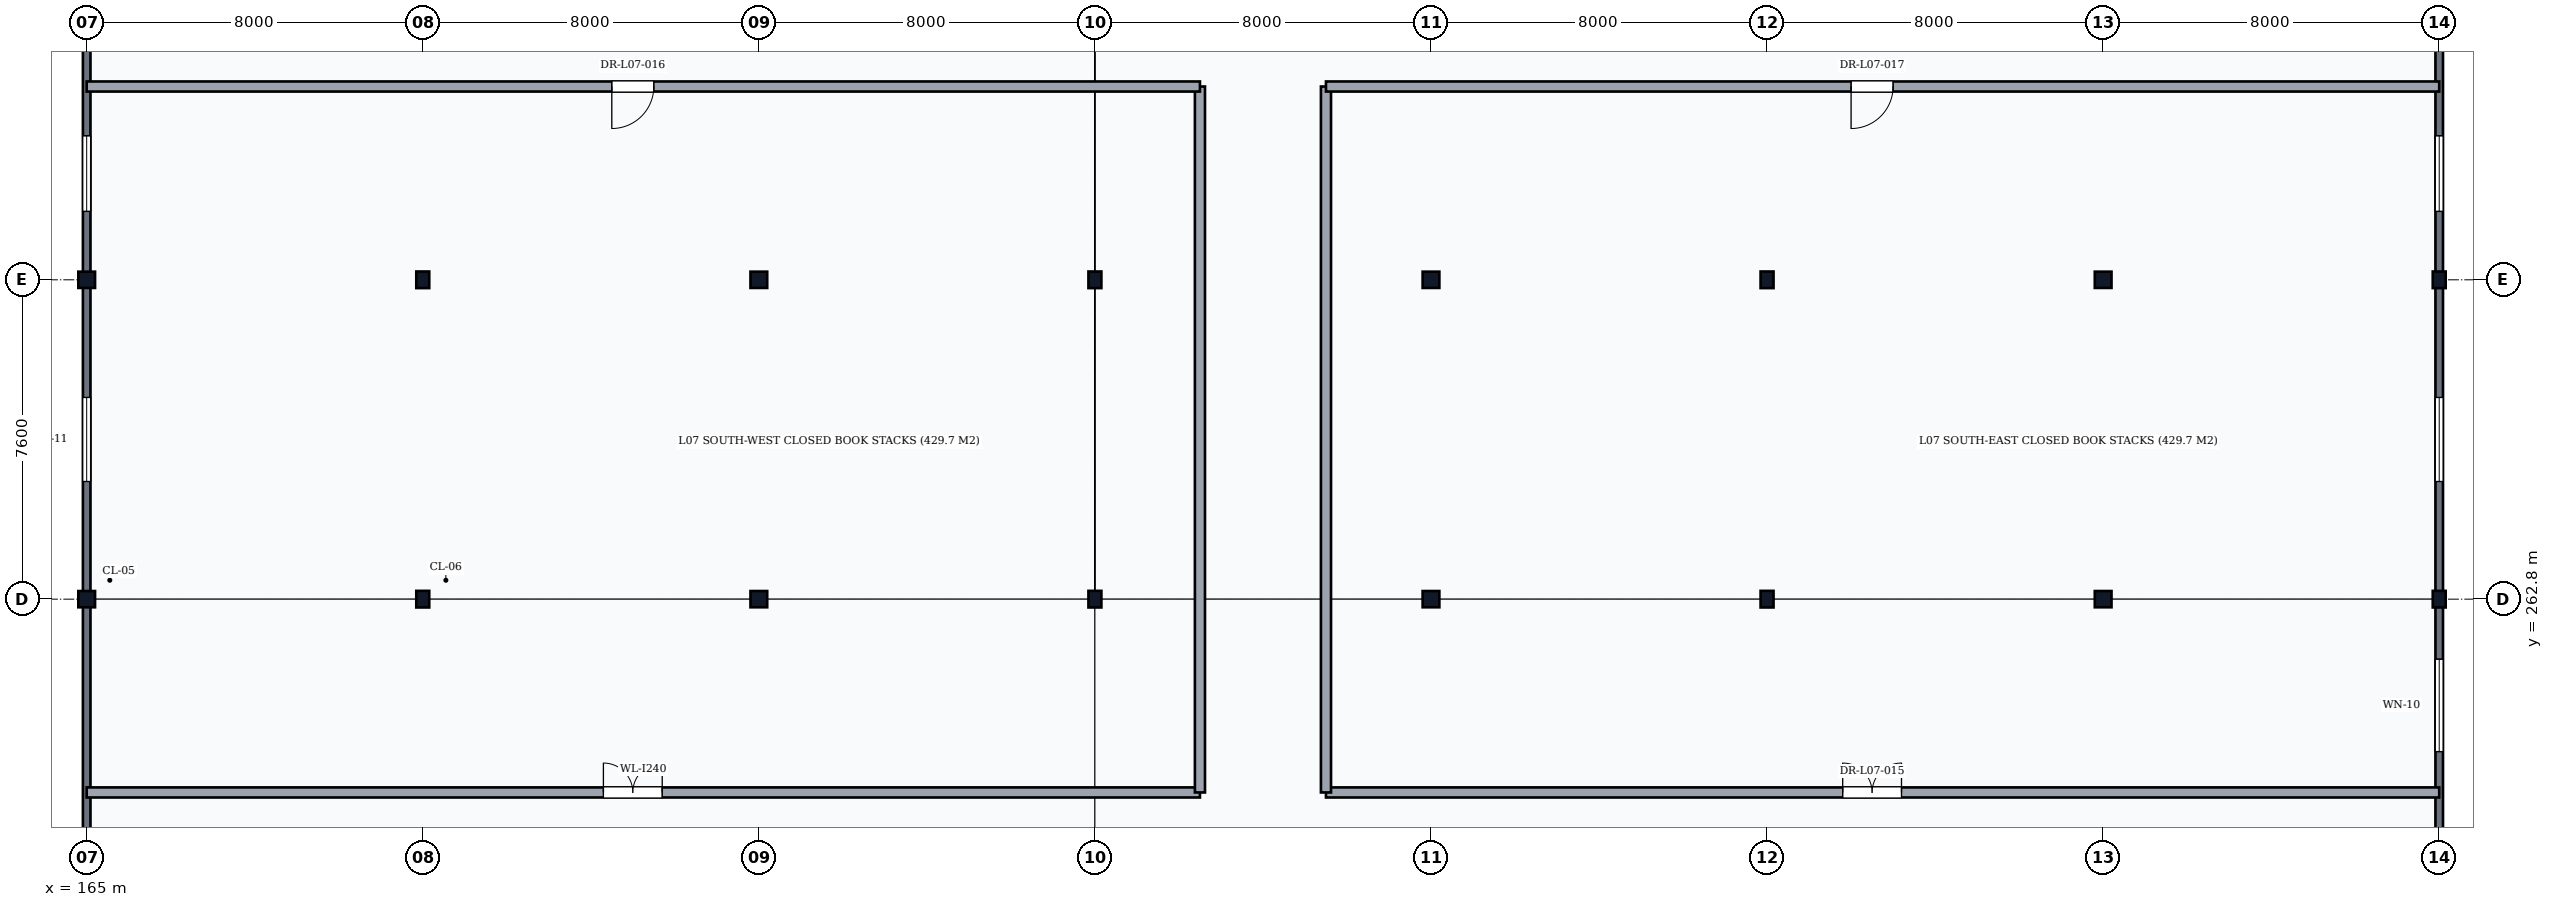
"""IFC4 building model, lengths in metres.
Left out: names, types, materials, properties, quantities, classifications, styles, units other than length and angle.
Written with IfcOpenShell. Run it as: python <this file> out.ifc"""

import sys

from ifc_helpers import new_model, si_unit, direction, frame, frame_2d, origin, origin_2d, place, context, subcontext, project, spatial, rectangle, i_section, extrude, element, fill, save


model = new_model("IFC4")
c1 = context("Model", 3, precision=1e-05, world=origin(), true_north=direction((0.0, 1.0)))
c2 = subcontext(c1, "Body", "Model", "MODEL_VIEW")
j1 = project(units=[si_unit("LENGTHUNIT", "METRE"), si_unit("PLANEANGLEUNIT", "RADIAN")], contexts=[c1])
p1 = place(None, origin())
s1 = spatial("IfcSite", under=j1, at=p1, CompositionType="ELEMENT")
p2 = place(p1, origin())
s2 = spatial("IfcBuilding", under=s1, at=p2, CompositionType="ELEMENT")
p3 = place(p2, frame((0.0, 0.0, 28.2)))
s3 = spatial("IfcBuildingStorey", under=s2, at=p3, CompositionType="ELEMENT", Elevation=28.2)
for number, where, z_axis, x_axis in (
    (1, (165.0, 262.8, 0.0), (0.0, 0.0, 1.0), (1.0, 0.0, 0.0)),
    (2, (165.0, 270.4, 0.0), (0.0, 0.0, 1.0), (1.0, 0.0, 0.0)),
):
    element("IfcColumn", number, at=place(p3, frame(where, z_axis=z_axis, x_axis=x_axis)), inside=s3, PredefinedType="COLUMN", context=c2, shape_type="SweptSolid", body=[
        extrude(i_section(OverallWidth=0.398, OverallDepth=0.387, WebThickness=0.021, FlangeThickness=0.033, FilletRadius=0.015, at=origin_2d()), origin(), (0.0, 0.0, 1.0), 3.9),
    ])
for number, where, z_axis, x_axis in (
    (3, (173.0, 262.8, 0.0), (0.0, 0.0, 1.0), (1.0, 0.0, 0.0)),
    (4, (173.0, 270.4, 0.0), (0.0, 0.0, 1.0), (1.0, 0.0, 0.0)),
):
    element("IfcColumn", number, at=place(p3, frame(where, z_axis=z_axis, x_axis=x_axis)), inside=s3, PredefinedType="COLUMN", context=c2, shape_type="SweptSolid", body=[
        extrude(i_section(OverallWidth=0.308, OverallDepth=0.395, WebThickness=0.021, FlangeThickness=0.04, FilletRadius=0.027, at=origin_2d()), origin(), (0.0, 0.0, 1.0), 3.9),
    ])
for number, where, z_axis, x_axis in (
    (5, (181.0, 262.8, 0.0), (0.0, 0.0, 1.0), (1.0, 0.0, 0.0)),
    (6, (181.0, 270.4, 0.0), (0.0, 0.0, 1.0), (1.0, 0.0, 0.0)),
):
    element("IfcColumn", number, at=place(p3, frame(where, z_axis=z_axis, x_axis=x_axis)), inside=s3, PredefinedType="COLUMN", context=c2, shape_type="SweptSolid", body=[
        extrude(i_section(OverallWidth=0.398, OverallDepth=0.387, WebThickness=0.021, FlangeThickness=0.033, FilletRadius=0.015, at=origin_2d()), origin(), (0.0, 0.0, 1.0), 3.9),
    ])
for number, where, z_axis, x_axis in (
    (7, (189.0, 262.8, 0.0), (0.0, 0.0, 1.0), (1.0, 0.0, 0.0)),
    (8, (189.0, 270.4, 0.0), (0.0, 0.0, 1.0), (1.0, 0.0, 0.0)),
):
    element("IfcColumn", number, at=place(p3, frame(where, z_axis=z_axis, x_axis=x_axis)), inside=s3, PredefinedType="COLUMN", context=c2, shape_type="SweptSolid", body=[
        extrude(i_section(OverallWidth=0.308, OverallDepth=0.395, WebThickness=0.021, FlangeThickness=0.04, FilletRadius=0.027, at=origin_2d()), origin(), (0.0, 0.0, 1.0), 3.9),
    ])
for number, where, z_axis, x_axis in (
    (9, (197.0, 262.8, 0.0), (0.0, 0.0, 1.0), (1.0, 0.0, 0.0)),
    (10, (197.0, 270.4, 0.0), (0.0, 0.0, 1.0), (1.0, 0.0, 0.0)),
):
    element("IfcColumn", number, at=place(p3, frame(where, z_axis=z_axis, x_axis=x_axis)), inside=s3, PredefinedType="COLUMN", context=c2, shape_type="SweptSolid", body=[
        extrude(i_section(OverallWidth=0.398, OverallDepth=0.387, WebThickness=0.021, FlangeThickness=0.033, FilletRadius=0.015, at=origin_2d()), origin(), (0.0, 0.0, 1.0), 3.9),
    ])
for number, where, z_axis, x_axis in (
    (11, (205.0, 262.8, 0.0), (0.0, 0.0, 1.0), (1.0, 0.0, 0.0)),
    (12, (205.0, 270.4, 0.0), (0.0, 0.0, 1.0), (1.0, 0.0, 0.0)),
):
    element("IfcColumn", number, at=place(p3, frame(where, z_axis=z_axis, x_axis=x_axis)), inside=s3, PredefinedType="COLUMN", context=c2, shape_type="SweptSolid", body=[
        extrude(i_section(OverallWidth=0.308, OverallDepth=0.395, WebThickness=0.021, FlangeThickness=0.04, FilletRadius=0.027, at=origin_2d()), origin(), (0.0, 0.0, 1.0), 3.9),
    ])
for number, where, z_axis, x_axis in (
    (13, (213.0, 262.8, 0.0), (0.0, 0.0, 1.0), (1.0, 0.0, 0.0)),
    (14, (213.0, 270.4, 0.0), (0.0, 0.0, 1.0), (1.0, 0.0, 0.0)),
):
    element("IfcColumn", number, at=place(p3, frame(where, z_axis=z_axis, x_axis=x_axis)), inside=s3, PredefinedType="COLUMN", context=c2, shape_type="SweptSolid", body=[
        extrude(i_section(OverallWidth=0.398, OverallDepth=0.387, WebThickness=0.021, FlangeThickness=0.033, FilletRadius=0.015, at=origin_2d()), origin(), (0.0, 0.0, 1.0), 3.9),
    ])
for number, where, z_axis, x_axis in (
    (15, (221.0, 262.8, 0.0), (0.0, 0.0, 1.0), (1.0, 0.0, 0.0)),
    (16, (221.0, 270.4, 0.0), (0.0, 0.0, 1.0), (1.0, 0.0, 0.0)),
):
    element("IfcColumn", number, at=place(p3, frame(where, z_axis=z_axis, x_axis=x_axis)), inside=s3, PredefinedType="COLUMN", context=c2, shape_type="SweptSolid", body=[
        extrude(i_section(OverallWidth=0.308, OverallDepth=0.395, WebThickness=0.021, FlangeThickness=0.04, FilletRadius=0.027, at=origin_2d()), origin(), (0.0, 0.0, 1.0), 3.9),
    ])
p4 = place(p3, frame((165.0, 255.206, 0.0), z_axis=(0.0, 0.0, 1.0), x_axis=(0.0, 1.0, 0.0)))
e17 = element("IfcWall", 17, at=p4, inside=s3, PredefinedType="SOLIDWALL", context=c2, shape_type="SweptSolid", body=[
    extrude(rectangle(XDim=7.588, YDim=0.18, at=frame_2d((3.794, 0.0))), origin(), (0.0, 0.0, 1.0), 3.388),
])
p5 = place(p3, frame((165.0, 262.806, 0.0), z_axis=(0.0, 0.0, 1.0), x_axis=(0.0, 1.0, 0.0)))
e18 = element("IfcWall", 18, at=p5, inside=s3, PredefinedType="SOLIDWALL", context=c2, shape_type="SweptSolid", body=[
    extrude(rectangle(XDim=7.588, YDim=0.18, at=frame_2d((3.794, 0.0))), origin(), (0.0, 0.0, 1.0), 3.388),
])
p6 = place(p5, frame((2.794, 0.0, 0.95)))
e19 = element("IfcOpeningElement", 19, at=p6, cuts=e18, PredefinedType="OPENING", context=c2, shape_type="SweptSolid", body=[
    extrude(rectangle(XDim=2.0, YDim=2.1, at=frame_2d((1.0, 1.05))), frame((0.0, 0.105, 0.0), z_axis=(0.0, -1.0, 0.0), x_axis=(1.0, 0.0, 0.0)), (0.0, 0.0, 1.0), 0.21),
])
p7 = place(p3, frame((165.0, 270.406, 0.0), z_axis=(0.0, 0.0, 1.0), x_axis=(0.0, 1.0, 0.0)))
e20 = element("IfcWall", 20, at=p7, inside=s3, PredefinedType="SOLIDWALL", context=c2, shape_type="SweptSolid", body=[
    extrude(rectangle(XDim=7.588, YDim=0.18, at=frame_2d((3.794, 0.0))), origin(), (0.0, 0.0, 1.0), 3.388),
])
p8 = place(p7, frame((1.622, 0.0, 0.95)))
e21 = element("IfcOpeningElement", 21, at=p8, cuts=e20, PredefinedType="OPENING", context=c2, shape_type="SweptSolid", body=[
    extrude(rectangle(XDim=1.8, YDim=2.0, at=frame_2d((0.9, 1.0))), frame((0.0, 0.105, 0.0), z_axis=(0.0, -1.0, 0.0), x_axis=(1.0, 0.0, 0.0)), (0.0, 0.0, 1.0), 0.21),
])
p9 = place(p3, frame((221.0, 255.206, 0.0), z_axis=(0.0, 0.0, 1.0), x_axis=(0.0, 1.0, 0.0)))
e22 = element("IfcWall", 22, at=p9, inside=s3, PredefinedType="SOLIDWALL", context=c2, shape_type="SweptSolid", body=[
    extrude(rectangle(XDim=7.588, YDim=0.18, at=frame_2d((3.794, 0.0))), origin(), (0.0, 0.0, 1.0), 3.388),
])
p10 = place(p9, frame((3.966, 0.0, 0.95)))
e23 = element("IfcOpeningElement", 23, at=p10, cuts=e22, PredefinedType="OPENING", context=c2, shape_type="SweptSolid", body=[
    extrude(rectangle(XDim=2.2, YDim=2.1, at=frame_2d((1.1, 1.05))), frame((0.0, 0.105, 0.0), z_axis=(0.0, -1.0, 0.0), x_axis=(1.0, 0.0, 0.0)), (0.0, 0.0, 1.0), 0.21),
])
p11 = place(p3, frame((221.0, 262.806, 0.0), z_axis=(0.0, 0.0, 1.0), x_axis=(0.0, 1.0, 0.0)))
e24 = element("IfcWall", 24, at=p11, inside=s3, PredefinedType="SOLIDWALL", context=c2, shape_type="SweptSolid", body=[
    extrude(rectangle(XDim=7.588, YDim=0.18, at=frame_2d((3.794, 0.0))), origin(), (0.0, 0.0, 1.0), 3.388),
])
p12 = place(p11, frame((2.794, 0.0, 0.95)))
e25 = element("IfcOpeningElement", 25, at=p12, cuts=e24, PredefinedType="OPENING", context=c2, shape_type="SweptSolid", body=[
    extrude(rectangle(XDim=2.0, YDim=2.1, at=frame_2d((1.0, 1.05))), frame((0.0, 0.105, 0.0), z_axis=(0.0, -1.0, 0.0), x_axis=(1.0, 0.0, 0.0)), (0.0, 0.0, 1.0), 0.21),
])
p13 = place(p3, frame((221.0, 270.406, 0.0), z_axis=(0.0, 0.0, 1.0), x_axis=(0.0, 1.0, 0.0)))
e26 = element("IfcWall", 26, at=p13, inside=s3, PredefinedType="SOLIDWALL", context=c2, shape_type="SweptSolid", body=[
    extrude(rectangle(XDim=7.588, YDim=0.18, at=frame_2d((3.794, 0.0))), origin(), (0.0, 0.0, 1.0), 3.388),
])
p14 = place(p13, frame((1.622, 0.0, 0.95)))
e27 = element("IfcOpeningElement", 27, at=p14, cuts=e26, PredefinedType="OPENING", context=c2, shape_type="SweptSolid", body=[
    extrude(rectangle(XDim=1.8, YDim=2.0, at=frame_2d((0.9, 1.0))), frame((0.0, 0.105, 0.0), z_axis=(0.0, -1.0, 0.0), x_axis=(1.0, 0.0, 0.0)), (0.0, 0.0, 1.0), 0.21),
])
p15 = place(p3, frame((165.0, 258.2, 0.0), z_axis=(0.0, 0.0, 1.0), x_axis=(1.0, 0.0, 0.0)))
e28 = element("IfcWall", 28, at=p15, inside=s3, PredefinedType="PARTITIONING", context=c2, shape_type="SweptSolid", body=[
    extrude(rectangle(XDim=26.5, YDim=0.24, at=frame_2d((13.25, 0.0))), origin(), (0.0, 0.0, 1.0), 3.66),
])
p16 = place(p15, frame((12.3, 0.0, 0.0)))
e29 = element("IfcOpeningElement", 29, at=p16, cuts=e28, PredefinedType="OPENING", context=c2, shape_type="SweptSolid", body=[
    extrude(rectangle(XDim=1.4, YDim=2.1, at=frame_2d((0.7, 1.05))), frame((0.0, 0.135, 0.0), z_axis=(0.0, -1.0, 0.0), x_axis=(1.0, 0.0, 0.0)), (0.0, 0.0, 1.0), 0.27),
])
p17 = place(p3, frame((194.5, 258.2, 0.0), z_axis=(0.0, 0.0, 1.0), x_axis=(1.0, 0.0, 0.0)))
e30 = element("IfcWall", 30, at=p17, inside=s3, PredefinedType="PARTITIONING", context=c2, shape_type="SweptSolid", body=[
    extrude(rectangle(XDim=26.5, YDim=0.24, at=frame_2d((13.25, 0.0))), origin(), (0.0, 0.0, 1.0), 3.66),
])
p18 = place(p17, frame((12.3, 0.0, 0.0)))
e31 = element("IfcOpeningElement", 31, at=p18, cuts=e30, PredefinedType="OPENING", context=c2, shape_type="SweptSolid", body=[
    extrude(rectangle(XDim=1.4, YDim=2.1, at=frame_2d((0.7, 1.05))), frame((0.0, 0.135, 0.0), z_axis=(0.0, -1.0, 0.0), x_axis=(1.0, 0.0, 0.0)), (0.0, 0.0, 1.0), 0.27),
])
for number, where, z_axis, x_axis in (
    (32, (191.5, 258.2, 0.0), (0.0, 0.0, 1.0), (0.0, 1.0, 0.0)),
    (33, (194.5, 258.2, 0.0), (0.0, 0.0, 1.0), (0.0, 1.0, 0.0)),
):
    element("IfcWall", number, at=place(p3, frame(where, z_axis=z_axis, x_axis=x_axis)), inside=s3, PredefinedType="PARTITIONING", context=c2, shape_type="SweptSolid", body=[
        extrude(rectangle(XDim=16.8, YDim=0.24, at=frame_2d((8.4, 0.0))), origin(), (0.0, 0.0, 1.0), 3.66),
    ])
p19 = place(p3, frame((165.0, 275.0, 0.0), z_axis=(0.0, 0.0, 1.0), x_axis=(1.0, 0.0, 0.0)))
e34 = element("IfcWall", 34, at=p19, inside=s3, PredefinedType="PARTITIONING", context=c2, shape_type="SweptSolid", body=[
    extrude(rectangle(XDim=26.5, YDim=0.24, at=frame_2d((13.25, 0.0))), origin(), (0.0, 0.0, 1.0), 3.66),
])
p20 = place(p19, frame((12.5, 0.0, 0.0)))
e35 = element("IfcOpeningElement", 35, at=p20, cuts=e34, PredefinedType="OPENING", context=c2, shape_type="SweptSolid", body=[
    extrude(rectangle(XDim=1.0, YDim=2.1, at=frame_2d((0.5, 1.05))), frame((0.0, 0.135, 0.0), z_axis=(0.0, -1.0, 0.0), x_axis=(1.0, 0.0, 0.0)), (0.0, 0.0, 1.0), 0.27),
])
p21 = place(p3, frame((194.5, 275.0, 0.0), z_axis=(0.0, 0.0, 1.0), x_axis=(1.0, 0.0, 0.0)))
e36 = element("IfcWall", 36, at=p21, inside=s3, PredefinedType="PARTITIONING", context=c2, shape_type="SweptSolid", body=[
    extrude(rectangle(XDim=26.5, YDim=0.24, at=frame_2d((13.25, 0.0))), origin(), (0.0, 0.0, 1.0), 3.66),
])
p22 = place(p21, frame((12.5, 0.0, 0.0)))
e37 = element("IfcOpeningElement", 37, at=p22, cuts=e36, PredefinedType="OPENING", context=c2, shape_type="SweptSolid", body=[
    extrude(rectangle(XDim=1.0, YDim=2.1, at=frame_2d((0.5, 1.05))), frame((0.0, 0.135, 0.0), z_axis=(0.0, -1.0, 0.0), x_axis=(1.0, 0.0, 0.0)), (0.0, 0.0, 1.0), 0.27),
])
p23 = place(p6, origin())
e38 = element("IfcWindow", 38, at=p23, inside=s3, PartitioningType="DOUBLE_PANEL_VERTICAL", PredefinedType="WINDOW", context=c2, shape_type="SweptSolid", body=[
    extrude(rectangle(XDim=2.0, YDim=2.1, at=frame_2d((1.0, 1.05))), frame((0.0, 0.03, 0.0), z_axis=(0.0, -1.0, 0.0), x_axis=(1.0, 0.0, 0.0)), (0.0, 0.0, 1.0), 0.06),
])
fill(e19, e38)
p24 = place(p8, origin())
e39 = element("IfcWindow", 39, at=p24, inside=s3, PartitioningType="DOUBLE_PANEL_VERTICAL", PredefinedType="WINDOW", context=c2, shape_type="SweptSolid", body=[
    extrude(rectangle(XDim=1.8, YDim=2.0, at=frame_2d((0.9, 1.0))), frame((0.0, 0.03, 0.0), z_axis=(0.0, -1.0, 0.0), x_axis=(1.0, 0.0, 0.0)), (0.0, 0.0, 1.0), 0.06),
])
fill(e21, e39)
p25 = place(p10, origin())
e40 = element("IfcWindow", 40, at=p25, inside=s3, PartitioningType="DOUBLE_PANEL_VERTICAL", PredefinedType="WINDOW", context=c2, shape_type="SweptSolid", body=[
    extrude(rectangle(XDim=2.2, YDim=2.1, at=frame_2d((1.1, 1.05))), frame((0.0, 0.03, 0.0), z_axis=(0.0, -1.0, 0.0), x_axis=(1.0, 0.0, 0.0)), (0.0, 0.0, 1.0), 0.06),
])
fill(e23, e40)
p26 = place(p12, origin())
e41 = element("IfcWindow", 41, at=p26, inside=s3, PartitioningType="DOUBLE_PANEL_VERTICAL", PredefinedType="WINDOW", context=c2, shape_type="SweptSolid", body=[
    extrude(rectangle(XDim=2.0, YDim=2.1, at=frame_2d((1.0, 1.05))), frame((0.0, 0.03, 0.0), z_axis=(0.0, -1.0, 0.0), x_axis=(1.0, 0.0, 0.0)), (0.0, 0.0, 1.0), 0.06),
])
fill(e25, e41)
p27 = place(p14, origin())
e42 = element("IfcWindow", 42, at=p27, inside=s3, PartitioningType="DOUBLE_PANEL_VERTICAL", PredefinedType="WINDOW", context=c2, shape_type="SweptSolid", body=[
    extrude(rectangle(XDim=1.8, YDim=2.0, at=frame_2d((0.9, 1.0))), frame((0.0, 0.03, 0.0), z_axis=(0.0, -1.0, 0.0), x_axis=(1.0, 0.0, 0.0)), (0.0, 0.0, 1.0), 0.06),
])
fill(e27, e42)
p28 = place(p16, origin())
e43 = element("IfcDoor", 43, at=p28, inside=s3, OperationType="DOUBLE_DOOR_SINGLE_SWING", PredefinedType="DOOR", context=c2, shape_type="SweptSolid", body=[
    extrude(rectangle(XDim=1.4, YDim=2.1, at=frame_2d((0.7, 1.05))), frame((0.0, 0.025, 0.0), z_axis=(0.0, -1.0, 0.0), x_axis=(1.0, 0.0, 0.0)), (0.0, 0.0, 1.0), 0.05),
])
fill(e29, e43)
p29 = place(p18, origin())
e44 = element("IfcDoor", 44, at=p29, inside=s3, OperationType="DOUBLE_DOOR_SINGLE_SWING", PredefinedType="DOOR", context=c2, shape_type="SweptSolid", body=[
    extrude(rectangle(XDim=1.4, YDim=2.1, at=frame_2d((0.7, 1.05))), frame((0.0, 0.025, 0.0), z_axis=(0.0, -1.0, 0.0), x_axis=(1.0, 0.0, 0.0)), (0.0, 0.0, 1.0), 0.05),
])
fill(e31, e44)
p30 = place(p20, frame((1.0, 0.0, 0.0), z_axis=(0.0, 0.0, 1.0), x_axis=(-1.0, 0.0, 0.0)))
e45 = element("IfcDoor", 45, at=p30, inside=s3, OperationType="SINGLE_SWING_RIGHT", PredefinedType="DOOR", context=c2, shape_type="SweptSolid", body=[
    extrude(rectangle(XDim=1.0, YDim=2.1, at=frame_2d((0.5, 1.05))), frame((0.0, 0.025, 0.0), z_axis=(0.0, -1.0, 0.0), x_axis=(1.0, 0.0, 0.0)), (0.0, 0.0, 1.0), 0.05),
])
fill(e35, e45)
p31 = place(p22, frame((1.0, 0.0, 0.0), z_axis=(0.0, 0.0, 1.0), x_axis=(-1.0, 0.0, 0.0)))
e46 = element("IfcDoor", 46, at=p31, inside=s3, OperationType="SINGLE_SWING_RIGHT", PredefinedType="DOOR", context=c2, shape_type="SweptSolid", body=[
    extrude(rectangle(XDim=1.0, YDim=2.1, at=frame_2d((0.5, 1.05))), frame((0.0, 0.025, 0.0), z_axis=(0.0, -1.0, 0.0), x_axis=(1.0, 0.0, 0.0)), (0.0, 0.0, 1.0), 0.05),
])
fill(e37, e46)
save(model, sys.argv[1])
